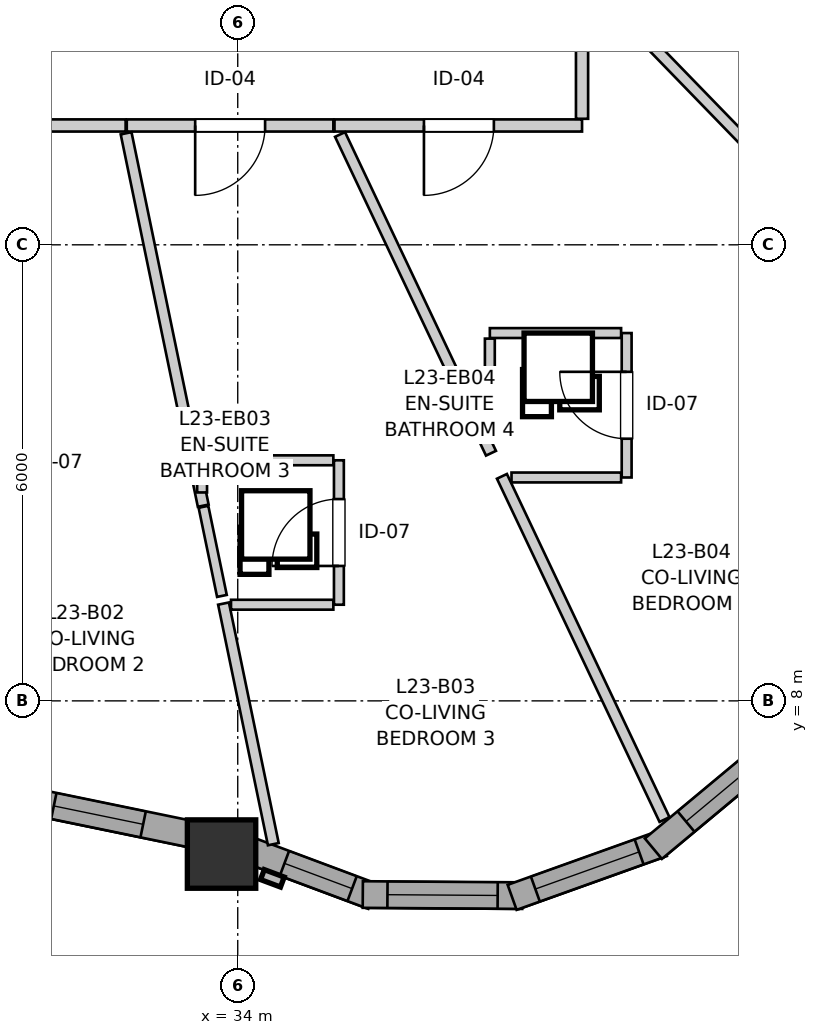
"""IFC4 building model, lengths in metres.
Left out: names, types, materials, properties, quantities, classifications, styles, units other than length and angle.
Written with IfcOpenShell. Run it as: python <this file> out.ifc"""

import sys

from ifc_helpers import new_model, si_unit, direction, frame, frame_2d, origin, origin_2d, place, context, subcontext, project, spatial, rectangle, extrude, source, transform, mapped, element, fill, save


model = new_model("IFC4")
c1 = context("Model", 3, precision=1e-05, world=origin(), true_north=direction((0.0, 1.0)))
c2 = subcontext(c1, "Body", "Model", "MODEL_VIEW")
j1 = project(units=[si_unit("LENGTHUNIT", "METRE"), si_unit("PLANEANGLEUNIT", "RADIAN")], contexts=[c1])
p1 = place(None, origin())
s1 = spatial("IfcSite", under=j1, at=p1, CompositionType="ELEMENT")
p2 = place(p1, origin())
s2 = spatial("IfcBuilding", under=s1, at=p2, CompositionType="ELEMENT")
p3 = place(p2, frame((0.0, 0.0, 80.0)))
s3 = spatial("IfcBuildingStorey", under=s2, at=p3, CompositionType="ELEMENT", Elevation=80.0)
m1 = source(origin(), c2, "Body", "SweptSolid", [
    extrude(rectangle(XDim=0.9, YDim=0.9, at=origin_2d()), origin(), (0.0, 0.0, 1.0), 2.935),
])
p4 = place(p3, frame((33.787, 5.985, 0.0), z_axis=(0.0, 0.0, 1.0), x_axis=(1.0, 0.0, 0.0)))
e1 = element("IfcColumn", 1, at=p4, inside=s3, PredefinedType="COLUMN", context=c2, shape_type="MappedRepresentation", body=[
    mapped(m1, transform((0.0, 0.0, 0.0), x_axis=(1.0, 0.0, 0.0), y_axis=(0.0, 1.0, 0.0), z_axis=(0.0, 0.0, 1.0), scale=1.0)),
])
p5 = place(p3, frame((30.724, 6.794, 0.0), z_axis=(0.0, 0.0, 1.0), x_axis=(0.979439663571, -0.201737317878, 0.0)))
e2 = element("IfcWall", 2, at=p5, inside=s3, PredefinedType="SOLIDWALL", context=c2, shape_type="SweptSolid", body=[
    extrude(rectangle(XDim=2.938, YDim=0.35, at=frame_2d((1.469, 0.0))), origin(), (0.0, 0.0, 1.0), 2.465),
])
p6 = place(p5, frame((0.874, 0.0, 0.82)))
e3 = element("IfcOpeningElement", 3, at=p6, cuts=e2, PredefinedType="OPENING", context=c2, shape_type="SweptSolid", body=[
    extrude(rectangle(XDim=1.2, YDim=1.45, at=frame_2d((0.6, 0.725))), frame((0.0, 0.185, 0.0), z_axis=(0.0, -1.0, 0.0), x_axis=(1.0, 0.0, 0.0)), (0.0, 0.0, 1.0), 0.37),
])
p7 = place(p3, frame((34.059, 6.07, 0.0), z_axis=(0.0, 0.0, 1.0), x_axis=(0.936803747811, -0.349855310219, 0.0)))
e4 = element("IfcWall", 4, at=p7, inside=s3, PredefinedType="SOLIDWALL", context=c2, shape_type="SweptSolid", body=[
    extrude(rectangle(XDim=1.836, YDim=0.35, at=frame_2d((0.918, 0.0))), origin(), (0.0, 0.0, 1.0), 2.465),
])
p8 = place(p7, frame((0.593, 0.0, 0.82)))
e5 = element("IfcOpeningElement", 5, at=p8, cuts=e4, PredefinedType="OPENING", context=c2, shape_type="SweptSolid", body=[
    extrude(rectangle(XDim=0.95, YDim=1.35, at=frame_2d((0.475, 0.675))), frame((0.0, 0.185, 0.0), z_axis=(0.0, -1.0, 0.0), x_axis=(1.0, 0.0, 0.0)), (0.0, 0.0, 1.0), 0.37),
])
p9 = place(p3, frame((35.646, 5.452, 0.0), z_axis=(0.0, 0.0, 1.0), x_axis=(0.999976451414, -0.006862697526, 0.0)))
e6 = element("IfcWall", 6, at=p9, inside=s3, PredefinedType="SOLIDWALL", context=c2, shape_type="SweptSolid", body=[
    extrude(rectangle(XDim=2.099, YDim=0.35, at=frame_2d((1.049, 0.0))), origin(), (0.0, 0.0, 1.0), 2.465),
])
p10 = place(p9, frame((0.324, 0.0, 0.82)))
e7 = element("IfcOpeningElement", 7, at=p10, cuts=e6, PredefinedType="OPENING", context=c2, shape_type="SweptSolid", body=[
    extrude(rectangle(XDim=1.45, YDim=1.25, at=frame_2d((0.725, 0.625))), frame((0.0, 0.185, 0.0), z_axis=(0.0, -1.0, 0.0), x_axis=(1.0, 0.0, 0.0)), (0.0, 0.0, 1.0), 0.37),
])
p11 = place(p3, frame((37.61, 5.415, 0.0), z_axis=(0.0, 0.0, 1.0), x_axis=(0.941473186867, 0.33708787936, 0.0)))
e8 = element("IfcWall", 8, at=p11, inside=s3, PredefinedType="SOLIDWALL", context=c2, shape_type="SweptSolid", body=[
    extrude(rectangle(XDim=2.099, YDim=0.35, at=frame_2d((1.049, 0.0))), origin(), (0.0, 0.0, 1.0), 2.465),
])
p12 = place(p11, frame((0.324, 0.0, 0.82)))
e9 = element("IfcOpeningElement", 9, at=p12, cuts=e8, PredefinedType="OPENING", context=c2, shape_type="SweptSolid", body=[
    extrude(rectangle(XDim=1.45, YDim=1.25, at=frame_2d((0.725, 0.625))), frame((0.0, 0.185, 0.0), z_axis=(0.0, -1.0, 0.0), x_axis=(1.0, 0.0, 0.0)), (0.0, 0.0, 1.0), 0.37),
])
p13 = place(p3, frame((39.469, 6.055, 0.0), z_axis=(0.0, 0.0, 1.0), x_axis=(0.768497696041, 0.639852554249, 0.0)))
e10 = element("IfcWall", 10, at=p13, inside=s3, PredefinedType="SOLIDWALL", context=c2, shape_type="SweptSolid", body=[
    extrude(rectangle(XDim=2.099, YDim=0.35, at=frame_2d((1.049, 0.0))), origin(), (0.0, 0.0, 1.0), 2.465),
])
p14 = place(p13, frame((0.559, 0.0, 0.82)))
e11 = element("IfcOpeningElement", 11, at=p14, cuts=e10, PredefinedType="OPENING", context=c2, shape_type="SweptSolid", body=[
    extrude(rectangle(XDim=1.25, YDim=1.35, at=frame_2d((0.625, 0.675))), frame((0.0, 0.185, 0.0), z_axis=(0.0, -1.0, 0.0), x_axis=(1.0, 0.0, 0.0)), (0.0, 0.0, 1.0), 0.37),
])
p15 = place(p3, frame((38.53, 15.57, 0.0), z_axis=(0.0, 0.0, 1.0), x_axis=(-1.0, 0.0, 0.0)))
e12 = element("IfcWall", 12, at=p15, inside=s3, PredefinedType="PARTITIONING", context=c2, shape_type="SweptSolid", body=[
    extrude(rectangle(XDim=3.257, YDim=0.16, at=frame_2d((1.628, 0.0))), origin(), (0.0, 0.0, 1.0), 2.935),
])
p16 = place(p15, frame((1.16, 0.0, 0.0)))
e13 = element("IfcOpeningElement", 13, at=p16, cuts=e12, PredefinedType="OPENING", context=c2, shape_type="SweptSolid", body=[
    extrude(rectangle(XDim=0.92, YDim=2.1, at=frame_2d((0.46, 1.05))), frame((0.0, 0.09, 0.0), z_axis=(0.0, -1.0, 0.0), x_axis=(1.0, 0.0, 0.0)), (0.0, 0.0, 1.0), 0.18),
])
p17 = place(p3, frame((32.525, 15.57, 0.0), z_axis=(0.0, 0.0, 1.0), x_axis=(-1.0, 0.0, 0.0)))
e14 = element("IfcWall", 14, at=p17, inside=s3, PredefinedType="PARTITIONING", context=c2, shape_type="SweptSolid", body=[
    extrude(rectangle(XDim=3.072, YDim=0.16, at=frame_2d((1.536, 0.0))), origin(), (0.0, 0.0, 1.0), 2.935),
])
p18 = place(p17, frame((1.098, 0.0, 0.0)))
e15 = element("IfcOpeningElement", 15, at=p18, cuts=e14, PredefinedType="OPENING", context=c2, shape_type="SweptSolid", body=[
    extrude(rectangle(XDim=0.92, YDim=2.1, at=frame_2d((0.46, 1.05))), frame((0.0, 0.09, 0.0), z_axis=(0.0, -1.0, 0.0), x_axis=(1.0, 0.0, 0.0)), (0.0, 0.0, 1.0), 0.18),
])
p19 = place(p3, frame((35.258, 15.57, 0.0), z_axis=(0.0, 0.0, 1.0), x_axis=(-1.0, 0.0, 0.0)))
e16 = element("IfcWall", 16, at=p19, inside=s3, PredefinedType="PARTITIONING", context=c2, shape_type="SweptSolid", body=[
    extrude(rectangle(XDim=2.718, YDim=0.16, at=frame_2d((1.359, 0.0))), origin(), (0.0, 0.0, 1.0), 2.935),
])
p20 = place(p19, frame((0.898, 0.0, 0.0)))
e17 = element("IfcOpeningElement", 17, at=p20, cuts=e16, PredefinedType="OPENING", context=c2, shape_type="SweptSolid", body=[
    extrude(rectangle(XDim=0.92, YDim=2.1, at=frame_2d((0.46, 1.05))), frame((0.0, 0.09, 0.0), z_axis=(0.0, -1.0, 0.0), x_axis=(1.0, 0.0, 0.0)), (0.0, 0.0, 1.0), 0.18),
])
p21 = place(p3, frame((39.117, 10.939, 0.0), z_axis=(0.0, 0.0, 1.0), x_axis=(0.0, 1.0, 0.0)))
e18 = element("IfcWall", 18, at=p21, inside=s3, PredefinedType="PARTITIONING", context=c2, shape_type="SweptSolid", body=[
    extrude(rectangle(XDim=1.9, YDim=0.13, at=frame_2d((0.95, 0.0))), origin(), (0.0, 0.0, 1.0), 2.935),
])
p22 = place(p21, frame((0.51, 0.0, 0.0)))
e19 = element("IfcOpeningElement", 19, at=p22, cuts=e18, PredefinedType="OPENING", context=c2, shape_type="SweptSolid", body=[
    extrude(rectangle(XDim=0.88, YDim=2.05, at=frame_2d((0.44, 1.025))), frame((0.0, 0.075, 0.0), z_axis=(0.0, -1.0, 0.0), x_axis=(1.0, 0.0, 0.0)), (0.0, 0.0, 1.0), 0.15),
])
p23 = place(p3, frame((35.331, 9.265, 0.0), z_axis=(0.0, 0.0, 1.0), x_axis=(0.0, 1.0, 0.0)))
e20 = element("IfcWall", 20, at=p23, inside=s3, PredefinedType="PARTITIONING", context=c2, shape_type="SweptSolid", body=[
    extrude(rectangle(XDim=1.9, YDim=0.13, at=frame_2d((0.95, 0.0))), origin(), (0.0, 0.0, 1.0), 2.935),
])
p24 = place(p23, frame((0.51, 0.0, 0.0)))
e21 = element("IfcOpeningElement", 21, at=p24, cuts=e20, PredefinedType="OPENING", context=c2, shape_type="SweptSolid", body=[
    extrude(rectangle(XDim=0.88, YDim=2.05, at=frame_2d((0.44, 1.025))), frame((0.0, 0.075, 0.0), z_axis=(0.0, -1.0, 0.0), x_axis=(1.0, 0.0, 0.0)), (0.0, 0.0, 1.0), 0.15),
])
p25 = place(p3, frame((38.667, 17.429, 0.0), z_axis=(0.0, 0.0, 1.0), x_axis=(0.696417222112, -0.717637131666, 0.0)))
e22 = element("IfcWall", 22, at=p25, inside=s3, PredefinedType="PARTITIONING", context=c2, shape_type="SweptSolid", body=[
    extrude(rectangle(XDim=6.04, YDim=0.145, at=frame_2d((3.02, 0.0))), origin(), (0.0, 0.0, 1.0), 2.935),
])
p26 = place(p3, frame((32.531, 15.468, 0.0), z_axis=(0.0, 0.0, 1.0), x_axis=(0.202792769077, -0.979221677053, 0.0)))
e23 = element("IfcWall", 23, at=p26, inside=s3, PredefinedType="PARTITIONING", context=c2, shape_type="SweptSolid", body=[
    extrude(rectangle(XDim=5.003, YDim=0.145, at=frame_2d((2.502, 0.0))), origin(), (0.0, 0.0, 1.0), 2.935),
])
p27 = place(p3, frame((37.476, 10.954, 0.0), z_axis=(0.0, 0.0, 1.0), x_axis=(0.428094746621, -0.903733859007, 0.0)))
e24 = element("IfcWall", 24, at=p27, inside=s3, PredefinedType="PARTITIONING", context=c2, shape_type="SweptSolid", body=[
    extrude(rectangle(XDim=4.996, YDim=0.145, at=frame_2d((2.498, 0.0))), origin(), (0.0, 0.0, 1.0), 2.935),
])
p28 = place(p3, frame((35.346, 15.452, 0.0), z_axis=(0.0, 0.0, 1.0), x_axis=(0.428023015228, -0.903767834366, 0.0)))
e25 = element("IfcWall", 25, at=p28, inside=s3, PredefinedType="PARTITIONING", context=c2, shape_type="SweptSolid", body=[
    extrude(rectangle(XDim=4.64, YDim=0.145, at=frame_2d((2.32, 0.0))), origin(), (0.0, 0.0, 1.0), 2.935),
])
p29 = place(p3, frame((33.813, 9.28, 0.0), z_axis=(0.0, 0.0, 1.0), x_axis=(0.202648062782, -0.979251633979, 0.0)))
e26 = element("IfcWall", 26, at=p29, inside=s3, PredefinedType="PARTITIONING", context=c2, shape_type="SweptSolid", body=[
    extrude(rectangle(XDim=3.232, YDim=0.145, at=frame_2d((1.616, 0.0))), origin(), (0.0, 0.0, 1.0), 2.935),
])
p30 = place(p3, frame((38.53, 15.658, 0.0), z_axis=(0.0, 0.0, 1.0), x_axis=(0.0, 1.0, 0.0)))
e27 = element("IfcWall", 27, at=p30, inside=s3, PredefinedType="PARTITIONING", context=c2, shape_type="SweptSolid", body=[
    extrude(rectangle(XDim=1.682, YDim=0.16, at=frame_2d((0.841, 0.0))), origin(), (0.0, 0.0, 1.0), 2.935),
])
p31 = place(p3, frame((33.626, 11.165, 0.0), z_axis=(0.0, 0.0, 1.0), x_axis=(1.0, 0.0, 0.0)))
e28 = element("IfcWall", 28, at=p31, inside=s3, PredefinedType="PARTITIONING", context=c2, shape_type="SweptSolid", body=[
    extrude(rectangle(XDim=1.632, YDim=0.13, at=frame_2d((0.816, 0.0))), origin(), (0.0, 0.0, 1.0), 2.935),
])
p32 = place(p3, frame((37.317, 12.839, 0.0), z_axis=(0.0, 0.0, 1.0), x_axis=(1.0, 0.0, 0.0)))
e29 = element("IfcWall", 29, at=p32, inside=s3, PredefinedType="PARTITIONING", context=c2, shape_type="SweptSolid", body=[
    extrude(rectangle(XDim=1.727, YDim=0.13, at=frame_2d((0.864, 0.0))), origin(), (0.0, 0.0, 1.0), 2.935),
])
p33 = place(p3, frame((37.602, 10.939, 0.0), z_axis=(0.0, 0.0, 1.0), x_axis=(1.0, 0.0, 0.0)))
e30 = element("IfcWall", 30, at=p33, inside=s3, PredefinedType="PARTITIONING", context=c2, shape_type="SweptSolid", body=[
    extrude(rectangle(XDim=1.442, YDim=0.13, at=frame_2d((0.721, 0.0))), origin(), (0.0, 0.0, 1.0), 2.935),
])
p34 = place(p3, frame((37.317, 11.53, 0.0), z_axis=(0.0, 0.0, 1.0), x_axis=(0.0, 1.0, 0.0)))
e31 = element("IfcWall", 31, at=p34, inside=s3, PredefinedType="PARTITIONING", context=c2, shape_type="SweptSolid", body=[
    extrude(rectangle(XDim=1.236, YDim=0.13, at=frame_2d((0.618, 0.0))), origin(), (0.0, 0.0, 1.0), 2.935),
])
p35 = place(p3, frame((33.912, 9.265, 0.0), z_axis=(0.0, 0.0, 1.0), x_axis=(1.0, 0.0, 0.0)))
e32 = element("IfcWall", 32, at=p35, inside=s3, PredefinedType="PARTITIONING", context=c2, shape_type="SweptSolid", body=[
    extrude(rectangle(XDim=1.346, YDim=0.13, at=frame_2d((0.673, 0.0))), origin(), (0.0, 0.0, 1.0), 2.935),
])
p36 = place(p3, frame((33.549, 10.553, 0.0), z_axis=(0.0, 0.0, 1.0), x_axis=(0.202855035592, -0.97920877985, 0.0)))
e33 = element("IfcWall", 33, at=p36, inside=s3, PredefinedType="PARTITIONING", context=c2, shape_type="SweptSolid", body=[
    extrude(rectangle(XDim=1.198, YDim=0.13, at=frame_2d((0.599, 0.0))), origin(), (0.0, 0.0, 1.0), 2.935),
])
p37 = place(p3, frame((33.531, 10.742, 0.0), z_axis=(0.0, 0.0, 1.0), x_axis=(0.0, 1.0, 0.0)))
e34 = element("IfcWall", 34, at=p37, inside=s3, PredefinedType="PARTITIONING", context=c2, shape_type="SweptSolid", body=[
    extrude(rectangle(XDim=0.35, YDim=0.13, at=frame_2d((0.175, 0.0))), origin(), (0.0, 0.0, 1.0), 2.935),
])
m2 = source(origin(), c2, "Body", "SweptSolid", [
    extrude(rectangle(XDim=1.2, YDim=1.45, at=frame_2d((0.6, 0.725))), frame((0.0, 0.03, 0.0), z_axis=(0.0, -1.0, 0.0), x_axis=(1.0, 0.0, 0.0)), (0.0, 0.0, 1.0), 0.06),
])
p38 = place(p6, origin())
e35 = element("IfcWindow", 35, at=p38, inside=s3, PartitioningType="SINGLE_PANEL", PredefinedType="WINDOW", context=c2, shape_type="MappedRepresentation", body=[
    mapped(m2, transform((0.0, 0.0, 0.0), x_axis=(1.0, 0.0, 0.0), y_axis=(0.0, 1.0, 0.0), z_axis=(0.0, 0.0, 1.0), scale=1.0)),
])
fill(e3, e35)
m3 = source(origin(), c2, "Body", "SweptSolid", [
    extrude(rectangle(XDim=0.95, YDim=1.35, at=frame_2d((0.475, 0.675))), frame((0.0, 0.03, 0.0), z_axis=(0.0, -1.0, 0.0), x_axis=(1.0, 0.0, 0.0)), (0.0, 0.0, 1.0), 0.06),
])
p39 = place(p8, origin())
e36 = element("IfcWindow", 36, at=p39, inside=s3, PartitioningType="SINGLE_PANEL", PredefinedType="WINDOW", context=c2, shape_type="MappedRepresentation", body=[
    mapped(m3, transform((0.0, 0.0, 0.0), x_axis=(1.0, 0.0, 0.0), y_axis=(0.0, 1.0, 0.0), z_axis=(0.0, 0.0, 1.0), scale=1.0)),
])
fill(e5, e36)
m4 = source(origin(), c2, "Body", "SweptSolid", [
    extrude(rectangle(XDim=1.45, YDim=1.25, at=frame_2d((0.725, 0.625))), frame((0.0, 0.03, 0.0), z_axis=(0.0, -1.0, 0.0), x_axis=(1.0, 0.0, 0.0)), (0.0, 0.0, 1.0), 0.06),
])
p40 = place(p10, origin())
e37 = element("IfcWindow", 37, at=p40, inside=s3, PartitioningType="SINGLE_PANEL", PredefinedType="WINDOW", context=c2, shape_type="MappedRepresentation", body=[
    mapped(m4, transform((0.0, 0.0, 0.0), x_axis=(1.0, 0.0, 0.0), y_axis=(0.0, 1.0, 0.0), z_axis=(0.0, 0.0, 1.0), scale=1.0)),
])
fill(e7, e37)
p41 = place(p12, origin())
e38 = element("IfcWindow", 38, at=p41, inside=s3, PartitioningType="SINGLE_PANEL", PredefinedType="WINDOW", context=c2, shape_type="MappedRepresentation", body=[
    mapped(m4, transform((0.0, 0.0, 0.0), x_axis=(1.0, 0.0, 0.0), y_axis=(0.0, 1.0, 0.0), z_axis=(0.0, 0.0, 1.0), scale=1.0)),
])
fill(e9, e38)
m5 = source(origin(), c2, "Body", "SweptSolid", [
    extrude(rectangle(XDim=1.25, YDim=1.35, at=frame_2d((0.625, 0.675))), frame((0.0, 0.03, 0.0), z_axis=(0.0, -1.0, 0.0), x_axis=(1.0, 0.0, 0.0)), (0.0, 0.0, 1.0), 0.06),
])
p42 = place(p14, origin())
e39 = element("IfcWindow", 39, at=p42, inside=s3, PartitioningType="SINGLE_PANEL", PredefinedType="WINDOW", context=c2, shape_type="MappedRepresentation", body=[
    mapped(m5, transform((0.0, 0.0, 0.0), x_axis=(1.0, 0.0, 0.0), y_axis=(0.0, 1.0, 0.0), z_axis=(0.0, 0.0, 1.0), scale=1.0)),
])
fill(e11, e39)
m6 = source(origin(), c2, "Body", "SweptSolid", [
    extrude(rectangle(XDim=0.92, YDim=2.1, at=frame_2d((0.46, 1.05))), frame((0.0, 0.025, 0.0), z_axis=(0.0, -1.0, 0.0), x_axis=(1.0, 0.0, 0.0)), (0.0, 0.0, 1.0), 0.05),
])
p43 = place(p16, origin())
e40 = element("IfcDoor", 40, at=p43, inside=s3, OperationType="SINGLE_SWING_RIGHT", PredefinedType="DOOR", context=c2, shape_type="MappedRepresentation", body=[
    mapped(m6, transform((0.0, 0.0, 0.0), x_axis=(1.0, 0.0, 0.0), y_axis=(0.0, 1.0, 0.0), z_axis=(0.0, 0.0, 1.0), scale=1.0)),
])
fill(e13, e40)
p44 = place(p20, origin())
e41 = element("IfcDoor", 41, at=p44, inside=s3, OperationType="SINGLE_SWING_RIGHT", PredefinedType="DOOR", context=c2, shape_type="MappedRepresentation", body=[
    mapped(m6, transform((0.0, 0.0, 0.0), x_axis=(1.0, 0.0, 0.0), y_axis=(0.0, 1.0, 0.0), z_axis=(0.0, 0.0, 1.0), scale=1.0)),
])
fill(e17, e41)
m7 = source(origin(), c2, "Body", "SweptSolid", [
    extrude(rectangle(XDim=0.88, YDim=2.05, at=frame_2d((0.44, 1.025))), frame((0.0, 0.025, 0.0), z_axis=(0.0, -1.0, 0.0), x_axis=(1.0, 0.0, 0.0)), (0.0, 0.0, 1.0), 0.05),
])
p45 = place(p22, origin())
e42 = element("IfcDoor", 42, at=p45, inside=s3, OperationType="SINGLE_SWING_RIGHT", PredefinedType="DOOR", context=c2, shape_type="MappedRepresentation", body=[
    mapped(m7, transform((0.0, 0.0, 0.0), x_axis=(1.0, 0.0, 0.0), y_axis=(0.0, 1.0, 0.0), z_axis=(0.0, 0.0, 1.0), scale=1.0)),
])
fill(e19, e42)
p46 = place(p24, origin())
e43 = element("IfcDoor", 43, at=p46, inside=s3, OperationType="SINGLE_SWING_LEFT", PredefinedType="DOOR", context=c2, shape_type="MappedRepresentation", body=[
    mapped(m7, transform((0.0, 0.0, 0.0), x_axis=(1.0, 0.0, 0.0), y_axis=(0.0, 1.0, 0.0), z_axis=(0.0, 0.0, 1.0), scale=1.0)),
])
fill(e21, e43)
save(model, sys.argv[1])
